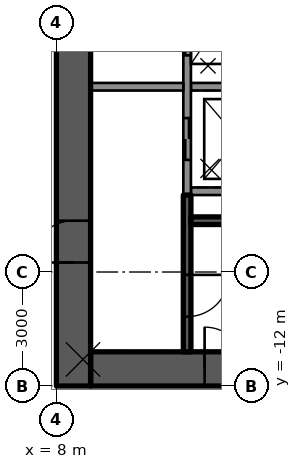
"""IFC4 building model, lengths in metres.
Left out: names, types, materials, properties, quantities, classifications, styles, units other than length and angle.
Written with IfcOpenShell. Run it as: python <this file> out.ifc"""

import sys

from ifc_helpers import new_model, si_unit, direction, frame, frame_2d, origin, place, context, subcontext, project, spatial, rectangle, extrude, element, fill, save


model = new_model("IFC4")
c1 = context("Model", 3, precision=1e-05, world=origin(), true_north=direction((0.0, 1.0)))
c2 = subcontext(c1, "Body", "Model", "MODEL_VIEW")
j1 = project(units=[si_unit("LENGTHUNIT", "METRE"), si_unit("PLANEANGLEUNIT", "RADIAN")], contexts=[c1])
p1 = place(None, origin())
s1 = spatial("IfcSite", under=j1, at=p1, CompositionType="ELEMENT")
p2 = place(p1, origin())
s2 = spatial("IfcBuilding", under=s1, at=p2, CompositionType="ELEMENT")
p3 = place(p2, frame((0.0, 0.0, 29.2)))
s3 = spatial("IfcBuildingStorey", under=s2, at=p3, CompositionType="ELEMENT", Elevation=29.2)
p4 = place(p3, frame((8.9, -11.55, 0.0), z_axis=(0.0, 0.0, 1.0), x_axis=(1.0, 0.0, 0.0)))
e1 = element("IfcWall", 1, at=p4, inside=s3, PredefinedType="SHEAR", context=c2, shape_type="SweptSolid", body=[
    extrude(rectangle(XDim=9.2, YDim=0.9, at=frame_2d((4.6, 0.0))), origin(), (0.0, 0.0, 1.0), 4.1),
])
p5 = place(p4, frame((3.0, 0.0, 0.0)))
e2 = element("IfcOpeningElement", 2, at=p5, cuts=e1, PredefinedType="OPENING", context=c2, shape_type="SweptSolid", body=[
    extrude(rectangle(XDim=1.1, YDim=2.1, at=frame_2d((0.55, 1.05))), frame((0.0, 0.46, 0.0), z_axis=(0.0, -1.0, 0.0), x_axis=(1.0, 0.0, 0.0)), (0.0, 0.0, 1.0), 0.92),
])
p6 = place(p3, frame((8.45, -12.0, 0.0), z_axis=(0.0, 0.0, 1.0), x_axis=(0.0, 1.0, 0.0)))
e3 = element("IfcWall", 3, at=p6, inside=s3, PredefinedType="SHEAR", context=c2, shape_type="SweptSolid", body=[
    extrude(rectangle(XDim=24.0, YDim=0.9, at=frame_2d((12.0, 0.0))), origin(), (0.0, 0.0, 1.0), 4.1),
])
p7 = place(p6, frame((12.6, 0.0, 0.0)))
e4 = element("IfcOpeningElement", 4, at=p7, cuts=e3, PredefinedType="OPENING", context=c2, shape_type="SweptSolid", body=[
    extrude(rectangle(XDim=1.8, YDim=2.1, at=frame_2d((0.9, 1.05))), frame((0.0, 0.46, 0.0), z_axis=(0.0, -1.0, 0.0), x_axis=(1.0, 0.0, 0.0)), (0.0, 0.0, 1.0), 0.92),
])
p8 = place(p6, frame((3.25, 0.0, 0.0)))
e5 = element("IfcOpeningElement", 5, at=p8, cuts=e3, PredefinedType="OPENING", context=c2, shape_type="SweptSolid", body=[
    extrude(rectangle(XDim=1.1, YDim=2.1, at=frame_2d((0.55, 1.05))), frame((0.0, 0.46, 0.0), z_axis=(0.0, -1.0, 0.0), x_axis=(1.0, 0.0, 0.0)), (0.0, 0.0, 1.0), 0.92),
])
p9 = place(p3, frame((11.54, -6.875, 0.0), z_axis=(0.0, 0.0, 1.0), x_axis=(1.0, 0.0, 0.0)))
e6 = element("IfcWall", 6, at=p9, inside=s3, PredefinedType="SOLIDWALL", context=c2, shape_type="SweptSolid", body=[
    extrude(rectangle(XDim=6.56, YDim=0.2, at=frame_2d((3.28, 0.0))), origin(), (0.0, 0.0, 1.0), 3.68),
])
p10 = place(p3, frame((11.54, -4.125, 0.0), z_axis=(0.0, 0.0, 1.0), x_axis=(1.0, 0.0, 0.0)))
e7 = element("IfcWall", 7, at=p10, inside=s3, PredefinedType="SOLIDWALL", context=c2, shape_type="SweptSolid", body=[
    extrude(rectangle(XDim=4.7, YDim=0.2, at=frame_2d((2.35, 0.0))), origin(), (0.0, 0.0, 1.0), 3.68),
])
p11 = place(p3, frame((11.44, 6.975, 0.0), z_axis=(0.0, 0.0, 1.0), x_axis=(0.0, -1.0, 0.0)))
e8 = element("IfcWall", 8, at=p11, inside=s3, PredefinedType="SOLIDWALL", context=c2, shape_type="SweptSolid", body=[
    extrude(rectangle(XDim=13.95, YDim=0.2, at=frame_2d((6.975, 0.0))), origin(), (0.0, 0.0, 1.0), 3.68),
])
p12 = place(p11, frame((0.925, 0.0, 0.0)))
e9 = element("IfcOpeningElement", 9, at=p12, cuts=e8, PredefinedType="OPENING", context=c2, shape_type="SweptSolid", body=[
    extrude(rectangle(XDim=1.1, YDim=2.1, at=frame_2d((0.55, 1.05))), frame((0.0, 0.11, 0.0), z_axis=(0.0, -1.0, 0.0), x_axis=(1.0, 0.0, 0.0)), (0.0, 0.0, 1.0), 0.22),
])
p13 = place(p11, frame((6.425, 0.0, 0.0)))
e10 = element("IfcOpeningElement", 10, at=p13, cuts=e8, PredefinedType="OPENING", context=c2, shape_type="SweptSolid", body=[
    extrude(rectangle(XDim=1.1, YDim=2.1, at=frame_2d((0.55, 1.05))), frame((0.0, 0.11, 0.0), z_axis=(0.0, -1.0, 0.0), x_axis=(1.0, 0.0, 0.0)), (0.0, 0.0, 1.0), 0.22),
])
p14 = place(p11, frame((9.175, 0.0, 0.0)))
e11 = element("IfcOpeningElement", 11, at=p14, cuts=e8, PredefinedType="OPENING", context=c2, shape_type="SweptSolid", body=[
    extrude(rectangle(XDim=1.1, YDim=2.1, at=frame_2d((0.55, 1.05))), frame((0.0, 0.11, 0.0), z_axis=(0.0, -1.0, 0.0), x_axis=(1.0, 0.0, 0.0)), (0.0, 0.0, 1.0), 0.22),
])
p15 = place(p11, frame((11.925, 0.0, 0.0)))
e12 = element("IfcOpeningElement", 12, at=p15, cuts=e8, PredefinedType="OPENING", context=c2, shape_type="SweptSolid", body=[
    extrude(rectangle(XDim=1.1, YDim=2.1, at=frame_2d((0.55, 1.05))), frame((0.0, 0.11, 0.0), z_axis=(0.0, -1.0, 0.0), x_axis=(1.0, 0.0, 0.0)), (0.0, 0.0, 1.0), 0.22),
])
p16 = place(p3, frame((11.44, -6.975, 0.0), z_axis=(0.0, 0.0, 1.0), x_axis=(0.0, -1.0, 0.0)))
e13 = element("IfcWall", 13, at=p16, inside=s3, PredefinedType="SOLIDWALL", context=c2, shape_type="SweptSolid", body=[
    extrude(rectangle(XDim=4.125, YDim=0.2, at=frame_2d((2.062, 0.0))), origin(), (0.0, 0.0, 1.0), 3.68),
])
p17 = place(p16, frame((2.1, 0.0, 0.0)))
e14 = element("IfcOpeningElement", 14, at=p17, cuts=e13, PredefinedType="OPENING", context=c2, shape_type="SweptSolid", body=[
    extrude(rectangle(XDim=1.1, YDim=2.1, at=frame_2d((0.55, 1.05))), frame((0.0, 0.11, 0.0), z_axis=(0.0, -1.0, 0.0), x_axis=(1.0, 0.0, 0.0)), (0.0, 0.0, 1.0), 0.22),
])
p18 = place(p3, frame((11.54, -7.65, 0.0), z_axis=(0.0, 0.0, 1.0), x_axis=(1.0, 0.0, 0.0)))
e15 = element("IfcWall", 15, at=p18, inside=s3, PredefinedType="SOLIDWALL", context=c2, shape_type="SweptSolid", body=[
    extrude(rectangle(XDim=6.56, YDim=0.2, at=frame_2d((3.28, 0.0))), origin(), (0.0, 0.0, 1.0), 3.68),
])
p19 = place(p3, frame((8.9, -4.125, 0.0), z_axis=(0.0, 0.0, 1.0), x_axis=(1.0, 0.0, 0.0)))
e16 = element("IfcWall", 16, at=p19, inside=s3, PredefinedType="PARTITIONING", context=c2, shape_type="SweptSolid", body=[
    extrude(rectangle(XDim=2.44, YDim=0.2, at=frame_2d((1.22, 0.0))), origin(), (0.0, 0.0, 1.0), 3.68),
])
p20 = place(p14, origin())
e17 = element("IfcDoor", 17, at=p20, inside=s3, OperationType="DOUBLE_DOOR_SLIDING", PredefinedType="DOOR", context=c2, shape_type="SweptSolid", body=[
    extrude(rectangle(XDim=1.1, YDim=2.1, at=frame_2d((0.55, 1.05))), frame((0.0, 0.025, 0.0), z_axis=(0.0, -1.0, 0.0), x_axis=(1.0, 0.0, 0.0)), (0.0, 0.0, 1.0), 0.05),
])
fill(e11, e17)
p21 = place(p15, origin())
e18 = element("IfcDoor", 18, at=p21, inside=s3, OperationType="DOUBLE_DOOR_SLIDING", PredefinedType="DOOR", context=c2, shape_type="SweptSolid", body=[
    extrude(rectangle(XDim=1.1, YDim=2.1, at=frame_2d((0.55, 1.05))), frame((0.0, 0.025, 0.0), z_axis=(0.0, -1.0, 0.0), x_axis=(1.0, 0.0, 0.0)), (0.0, 0.0, 1.0), 0.05),
])
fill(e12, e18)
p22 = place(p8, origin())
e19 = element("IfcDoor", 19, at=p22, inside=s3, OperationType="SINGLE_SWING_LEFT", PredefinedType="DOOR", context=c2, shape_type="SweptSolid", body=[
    extrude(rectangle(XDim=1.1, YDim=2.1, at=frame_2d((0.55, 1.05))), frame((0.0, 0.025, 0.0), z_axis=(0.0, -1.0, 0.0), x_axis=(1.0, 0.0, 0.0)), (0.0, 0.0, 1.0), 0.05),
])
fill(e5, e19)
p23 = place(p5, origin())
e20 = element("IfcDoor", 20, at=p23, inside=s3, OperationType="SINGLE_SWING_LEFT", PredefinedType="DOOR", context=c2, shape_type="SweptSolid", body=[
    extrude(rectangle(XDim=1.1, YDim=2.1, at=frame_2d((0.55, 1.05))), frame((0.0, 0.025, 0.0), z_axis=(0.0, -1.0, 0.0), x_axis=(1.0, 0.0, 0.0)), (0.0, 0.0, 1.0), 0.05),
])
fill(e2, e20)
p24 = place(p17, origin())
e21 = element("IfcDoor", 21, at=p24, inside=s3, OperationType="SINGLE_SWING_RIGHT", PredefinedType="DOOR", context=c2, shape_type="SweptSolid", body=[
    extrude(rectangle(XDim=1.1, YDim=2.1, at=frame_2d((0.55, 1.05))), frame((0.0, 0.025, 0.0), z_axis=(0.0, -1.0, 0.0), x_axis=(1.0, 0.0, 0.0)), (0.0, 0.0, 1.0), 0.05),
])
fill(e14, e21)
save(model, sys.argv[1])
